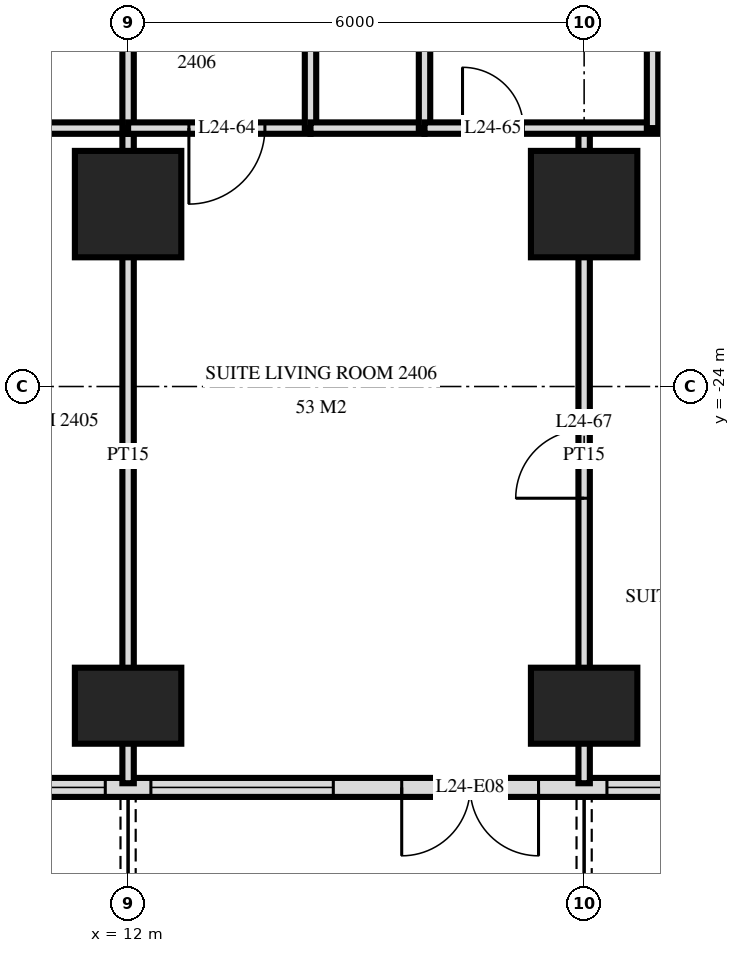
"""IFC4 building model, lengths in metres.
Left out: names, types, materials, properties, quantities, classifications, styles, units other than length and angle.
Written with IfcOpenShell. Run it as: python <this file> out.ifc"""

import sys

from ifc_helpers import new_model, si_unit, direction, frame, frame_2d, origin, origin_2d, place, context, subcontext, project, spatial, rectangle, extrude, element, fill, save


model = new_model("IFC4")
c1 = context("Model", 3, precision=1e-05, world=origin(), true_north=direction((0.0, 1.0)))
c2 = subcontext(c1, "Body", "Model", "MODEL_VIEW")
j1 = project(units=[si_unit("LENGTHUNIT", "METRE"), si_unit("PLANEANGLEUNIT", "RADIAN")], contexts=[c1])
p1 = place(None, origin())
s1 = spatial("IfcSite", under=j1, at=p1, CompositionType="ELEMENT")
p2 = place(p1, origin())
s2 = spatial("IfcBuilding", under=s1, at=p2, CompositionType="ELEMENT")
p3 = place(p2, frame((0.0, 0.0, 96.0)))
s3 = spatial("IfcBuildingStorey", under=s2, at=p3, CompositionType="ELEMENT", Elevation=96.0)
p4 = place(p3, frame((12.0, -28.2, 0.0), z_axis=(0.0, 0.0, 1.0), x_axis=(1.0, 0.0, 0.0)))
e1 = element("IfcColumn", 1, at=p4, inside=s3, PredefinedType="COLUMN", context=c2, shape_type="SweptSolid", body=[
    extrude(rectangle(XDim=1.4, YDim=1.0, at=origin_2d()), origin(), (0.0, 0.0, 1.0), 3.6),
])
p5 = place(p3, frame((12.0, -21.6, 0.0), z_axis=(0.0, 0.0, 1.0), x_axis=(1.0, 0.0, 0.0)))
e2 = element("IfcColumn", 2, at=p5, inside=s3, PredefinedType="COLUMN", context=c2, shape_type="SweptSolid", body=[
    extrude(rectangle(XDim=1.4, YDim=1.4, at=origin_2d()), origin(), (0.0, 0.0, 1.0), 3.6),
])
p6 = place(p3, frame((18.0, -28.2, 0.0), z_axis=(0.0, 0.0, 1.0), x_axis=(1.0, 0.0, 0.0)))
e3 = element("IfcColumn", 3, at=p6, inside=s3, PredefinedType="COLUMN", context=c2, shape_type="SweptSolid", body=[
    extrude(rectangle(XDim=1.4, YDim=1.0, at=origin_2d()), origin(), (0.0, 0.0, 1.0), 3.6),
])
p7 = place(p3, frame((18.0, -21.6, 0.0), z_axis=(0.0, 0.0, 1.0), x_axis=(1.0, 0.0, 0.0)))
e4 = element("IfcColumn", 4, at=p7, inside=s3, PredefinedType="COLUMN", context=c2, shape_type="SweptSolid", body=[
    extrude(rectangle(XDim=1.4, YDim=1.4, at=origin_2d()), origin(), (0.0, 0.0, 1.0), 3.6),
])
p8 = place(p3, frame((-28.775, -29.275, 0.0), z_axis=(0.0, 0.0, 1.0), x_axis=(1.0, 0.0, 0.0)))
e5 = element("IfcWall", 5, at=p8, inside=s3, PredefinedType="SOLIDWALL", context=c2, shape_type="SweptSolid", body=[
    extrude(rectangle(XDim=57.551, YDim=0.25, at=frame_2d((28.775, 0.0))), origin(), (0.0, 0.0, 1.0), 3.32),
])
p9 = place(p8, frame((0.575, 0.0, 0.0)))
e6 = element("IfcOpeningElement", 6, at=p9, cuts=e5, PredefinedType="OPENING", context=c2, shape_type="SweptSolid", body=[
    extrude(rectangle(XDim=1.8, YDim=2.4, at=frame_2d((0.9, 1.2))), frame((0.0, 0.135, 0.0), z_axis=(0.0, -1.0, 0.0), x_axis=(1.0, 0.0, 0.0)), (0.0, 0.0, 1.0), 0.27),
])
p10 = place(p8, frame((5.075, 0.0, 0.3)))
e7 = element("IfcOpeningElement", 7, at=p10, cuts=e5, PredefinedType="OPENING", context=c2, shape_type="SweptSolid", body=[
    extrude(rectangle(XDim=2.4, YDim=2.1, at=frame_2d((1.2, 1.05))), frame((0.0, 0.135, 0.0), z_axis=(0.0, -1.0, 0.0), x_axis=(1.0, 0.0, 0.0)), (0.0, 0.0, 1.0), 0.27),
])
p11 = place(p8, frame((8.375, 0.0, 0.0)))
e8 = element("IfcOpeningElement", 8, at=p11, cuts=e5, PredefinedType="OPENING", context=c2, shape_type="SweptSolid", body=[
    extrude(rectangle(XDim=1.8, YDim=2.4, at=frame_2d((0.9, 1.2))), frame((0.0, 0.135, 0.0), z_axis=(0.0, -1.0, 0.0), x_axis=(1.0, 0.0, 0.0)), (0.0, 0.0, 1.0), 0.27),
])
p12 = place(p8, frame((11.375, 0.0, 0.0)))
e9 = element("IfcOpeningElement", 9, at=p12, cuts=e5, PredefinedType="OPENING", context=c2, shape_type="SweptSolid", body=[
    extrude(rectangle(XDim=1.8, YDim=2.4, at=frame_2d((0.9, 1.2))), frame((0.0, 0.135, 0.0), z_axis=(0.0, -1.0, 0.0), x_axis=(1.0, 0.0, 0.0)), (0.0, 0.0, 1.0), 0.27),
])
p13 = place(p8, frame((14.075, 0.0, 0.3)))
e10 = element("IfcOpeningElement", 10, at=p13, cuts=e5, PredefinedType="OPENING", context=c2, shape_type="SweptSolid", body=[
    extrude(rectangle(XDim=2.4, YDim=2.1, at=frame_2d((1.2, 1.05))), frame((0.0, 0.135, 0.0), z_axis=(0.0, -1.0, 0.0), x_axis=(1.0, 0.0, 0.0)), (0.0, 0.0, 1.0), 0.27),
])
p14 = place(p8, frame((17.375, 0.0, 0.0)))
e11 = element("IfcOpeningElement", 11, at=p14, cuts=e5, PredefinedType="OPENING", context=c2, shape_type="SweptSolid", body=[
    extrude(rectangle(XDim=1.8, YDim=2.4, at=frame_2d((0.9, 1.2))), frame((0.0, 0.135, 0.0), z_axis=(0.0, -1.0, 0.0), x_axis=(1.0, 0.0, 0.0)), (0.0, 0.0, 1.0), 0.27),
])
p15 = place(p8, frame((20.075, 0.0, 0.3)))
e12 = element("IfcOpeningElement", 12, at=p15, cuts=e5, PredefinedType="OPENING", context=c2, shape_type="SweptSolid", body=[
    extrude(rectangle(XDim=2.4, YDim=2.1, at=frame_2d((1.2, 1.05))), frame((0.0, 0.135, 0.0), z_axis=(0.0, -1.0, 0.0), x_axis=(1.0, 0.0, 0.0)), (0.0, 0.0, 1.0), 0.27),
])
p16 = place(p8, frame((23.075, 0.0, 0.3)))
e13 = element("IfcOpeningElement", 13, at=p16, cuts=e5, PredefinedType="OPENING", context=c2, shape_type="SweptSolid", body=[
    extrude(rectangle(XDim=2.4, YDim=2.1, at=frame_2d((1.2, 1.05))), frame((0.0, 0.135, 0.0), z_axis=(0.0, -1.0, 0.0), x_axis=(1.0, 0.0, 0.0)), (0.0, 0.0, 1.0), 0.27),
])
p17 = place(p8, frame((26.375, 0.0, 0.0)))
e14 = element("IfcOpeningElement", 14, at=p17, cuts=e5, PredefinedType="OPENING", context=c2, shape_type="SweptSolid", body=[
    extrude(rectangle(XDim=1.8, YDim=2.4, at=frame_2d((0.9, 1.2))), frame((0.0, 0.135, 0.0), z_axis=(0.0, -1.0, 0.0), x_axis=(1.0, 0.0, 0.0)), (0.0, 0.0, 1.0), 0.27),
])
p18 = place(p8, frame((29.375, 0.0, 0.0)))
e15 = element("IfcOpeningElement", 15, at=p18, cuts=e5, PredefinedType="OPENING", context=c2, shape_type="SweptSolid", body=[
    extrude(rectangle(XDim=1.8, YDim=2.4, at=frame_2d((0.9, 1.2))), frame((0.0, 0.135, 0.0), z_axis=(0.0, -1.0, 0.0), x_axis=(1.0, 0.0, 0.0)), (0.0, 0.0, 1.0), 0.27),
])
p19 = place(p8, frame((32.075, 0.0, 0.3)))
e16 = element("IfcOpeningElement", 16, at=p19, cuts=e5, PredefinedType="OPENING", context=c2, shape_type="SweptSolid", body=[
    extrude(rectangle(XDim=2.4, YDim=2.1, at=frame_2d((1.2, 1.05))), frame((0.0, 0.135, 0.0), z_axis=(0.0, -1.0, 0.0), x_axis=(1.0, 0.0, 0.0)), (0.0, 0.0, 1.0), 0.27),
])
p20 = place(p8, frame((35.375, 0.0, 0.0)))
e17 = element("IfcOpeningElement", 17, at=p20, cuts=e5, PredefinedType="OPENING", context=c2, shape_type="SweptSolid", body=[
    extrude(rectangle(XDim=1.8, YDim=2.4, at=frame_2d((0.9, 1.2))), frame((0.0, 0.135, 0.0), z_axis=(0.0, -1.0, 0.0), x_axis=(1.0, 0.0, 0.0)), (0.0, 0.0, 1.0), 0.27),
])
p21 = place(p8, frame((38.075, 0.0, 0.3)))
e18 = element("IfcOpeningElement", 18, at=p21, cuts=e5, PredefinedType="OPENING", context=c2, shape_type="SweptSolid", body=[
    extrude(rectangle(XDim=2.4, YDim=2.1, at=frame_2d((1.2, 1.05))), frame((0.0, 0.135, 0.0), z_axis=(0.0, -1.0, 0.0), x_axis=(1.0, 0.0, 0.0)), (0.0, 0.0, 1.0), 0.27),
])
p22 = place(p8, frame((41.075, 0.0, 0.3)))
e19 = element("IfcOpeningElement", 19, at=p22, cuts=e5, PredefinedType="OPENING", context=c2, shape_type="SweptSolid", body=[
    extrude(rectangle(XDim=2.4, YDim=2.1, at=frame_2d((1.2, 1.05))), frame((0.0, 0.135, 0.0), z_axis=(0.0, -1.0, 0.0), x_axis=(1.0, 0.0, 0.0)), (0.0, 0.0, 1.0), 0.27),
])
p23 = place(p8, frame((44.375, 0.0, 0.0)))
e20 = element("IfcOpeningElement", 20, at=p23, cuts=e5, PredefinedType="OPENING", context=c2, shape_type="SweptSolid", body=[
    extrude(rectangle(XDim=1.8, YDim=2.4, at=frame_2d((0.9, 1.2))), frame((0.0, 0.135, 0.0), z_axis=(0.0, -1.0, 0.0), x_axis=(1.0, 0.0, 0.0)), (0.0, 0.0, 1.0), 0.27),
])
p24 = place(p8, frame((47.075, 0.0, 0.3)))
e21 = element("IfcOpeningElement", 21, at=p24, cuts=e5, PredefinedType="OPENING", context=c2, shape_type="SweptSolid", body=[
    extrude(rectangle(XDim=2.4, YDim=2.1, at=frame_2d((1.2, 1.05))), frame((0.0, 0.135, 0.0), z_axis=(0.0, -1.0, 0.0), x_axis=(1.0, 0.0, 0.0)), (0.0, 0.0, 1.0), 0.27),
])
p25 = place(p8, frame((50.375, 0.0, 0.0)))
e22 = element("IfcOpeningElement", 22, at=p25, cuts=e5, PredefinedType="OPENING", context=c2, shape_type="SweptSolid", body=[
    extrude(rectangle(XDim=1.8, YDim=2.4, at=frame_2d((0.9, 1.2))), frame((0.0, 0.135, 0.0), z_axis=(0.0, -1.0, 0.0), x_axis=(1.0, 0.0, 0.0)), (0.0, 0.0, 1.0), 0.27),
])
p26 = place(p8, frame((53.375, 0.0, 0.0)))
e23 = element("IfcOpeningElement", 23, at=p26, cuts=e5, PredefinedType="OPENING", context=c2, shape_type="SweptSolid", body=[
    extrude(rectangle(XDim=1.8, YDim=2.4, at=frame_2d((0.9, 1.2))), frame((0.0, 0.135, 0.0), z_axis=(0.0, -1.0, 0.0), x_axis=(1.0, 0.0, 0.0)), (0.0, 0.0, 1.0), 0.27),
])
p27 = place(p3, frame((18.9, -20.6, 0.0), z_axis=(0.0, 0.0, 1.0), x_axis=(0.0, 1.0, 0.0)))
e24 = element("IfcWall", 24, at=p27, inside=s3, PredefinedType="PARTITIONING", context=c2, shape_type="SweptSolid", body=[
    extrude(rectangle(XDim=3.6, YDim=0.15, at=frame_2d((1.8, 0.0))), origin(), (0.0, 0.0, 1.0), 3.32),
])
p28 = place(p3, frame((18.0, -29.22, 0.0), z_axis=(0.0, 0.0, 1.0), x_axis=(0.0, 1.0, 0.0)))
e25 = element("IfcWall", 25, at=p28, inside=s3, PredefinedType="PARTITIONING", context=c2, shape_type="SweptSolid", body=[
    extrude(rectangle(XDim=8.62, YDim=0.15, at=frame_2d((4.31, 0.0))), origin(), (0.0, 0.0, 1.0), 3.32),
])
p29 = place(p28, frame((3.75, 0.0, 0.0)))
e26 = element("IfcOpeningElement", 26, at=p29, cuts=e25, PredefinedType="OPENING", context=c2, shape_type="SweptSolid", body=[
    extrude(rectangle(XDim=0.9, YDim=2.1, at=frame_2d((0.45, 1.05))), frame((0.0, 0.085, 0.0), z_axis=(0.0, -1.0, 0.0), x_axis=(1.0, 0.0, 0.0)), (0.0, 0.0, 1.0), 0.17),
])
p30 = place(p3, frame((15.9, -20.6, 0.0), z_axis=(0.0, 0.0, 1.0), x_axis=(0.0, 1.0, 0.0)))
e27 = element("IfcWall", 27, at=p30, inside=s3, PredefinedType="PLUMBINGWALL", context=c2, shape_type="SweptSolid", body=[
    extrude(rectangle(XDim=3.6, YDim=0.15, at=frame_2d((1.8, 0.0))), origin(), (0.0, 0.0, 1.0), 3.32),
])
p31 = place(p3, frame((14.4, -20.6, 0.0), z_axis=(0.0, 0.0, 1.0), x_axis=(0.0, 1.0, 0.0)))
e28 = element("IfcWall", 28, at=p31, inside=s3, PredefinedType="PARTITIONING", context=c2, shape_type="SweptSolid", body=[
    extrude(rectangle(XDim=3.6, YDim=0.15, at=frame_2d((1.8, 0.0))), origin(), (0.0, 0.0, 1.0), 3.32),
])
p32 = place(p31, frame((1.3, 0.0, 0.0)))
e29 = element("IfcOpeningElement", 29, at=p32, cuts=e28, PredefinedType="OPENING", context=c2, shape_type="SweptSolid", body=[
    extrude(rectangle(XDim=1.0, YDim=2.1, at=frame_2d((0.5, 1.05))), frame((0.0, 0.085, 0.0), z_axis=(0.0, -1.0, 0.0), x_axis=(1.0, 0.0, 0.0)), (0.0, 0.0, 1.0), 0.17),
])
p33 = place(p3, frame((12.0, -20.6, 0.0), z_axis=(0.0, 0.0, 1.0), x_axis=(0.0, 1.0, 0.0)))
e30 = element("IfcWall", 30, at=p33, inside=s3, PredefinedType="PARTITIONING", context=c2, shape_type="SweptSolid", body=[
    extrude(rectangle(XDim=3.6, YDim=0.15, at=frame_2d((1.8, 0.0))), origin(), (0.0, 0.0, 1.0), 3.32),
])
p34 = place(p3, frame((12.0, -29.22, 0.0), z_axis=(0.0, 0.0, 1.0), x_axis=(0.0, 1.0, 0.0)))
e31 = element("IfcWall", 31, at=p34, inside=s3, PredefinedType="PARTITIONING", context=c2, shape_type="SweptSolid", body=[
    extrude(rectangle(XDim=8.62, YDim=0.15, at=frame_2d((4.31, 0.0))), origin(), (0.0, 0.0, 1.0), 3.32),
])
p35 = place(p3, frame((12.0, -20.6, 0.0), z_axis=(0.0, 0.0, 1.0), x_axis=(1.0, 0.0, 0.0)))
e32 = element("IfcWall", 32, at=p35, inside=s3, PredefinedType="PARTITIONING", context=c2, shape_type="SweptSolid", body=[
    extrude(rectangle(XDim=2.4, YDim=0.15, at=frame_2d((1.2, 0.0))), origin(), (0.0, 0.0, 1.0), 3.32),
])
p36 = place(p35, frame((0.8, 0.0, 0.0)))
e33 = element("IfcOpeningElement", 33, at=p36, cuts=e32, PredefinedType="OPENING", context=c2, shape_type="SweptSolid", body=[
    extrude(rectangle(XDim=1.0, YDim=2.1, at=frame_2d((0.5, 1.05))), frame((0.0, 0.085, 0.0), z_axis=(0.0, -1.0, 0.0), x_axis=(1.0, 0.0, 0.0)), (0.0, 0.0, 1.0), 0.17),
])
p37 = place(p3, frame((10.3, -20.6, 0.0), z_axis=(0.0, 0.0, 1.0), x_axis=(1.0, 0.0, 0.0)))
e34 = element("IfcWall", 34, at=p37, inside=s3, PredefinedType="PARTITIONING", context=c2, shape_type="SweptSolid", body=[
    extrude(rectangle(XDim=1.7, YDim=0.15, at=frame_2d((0.85, 0.0))), origin(), (0.0, 0.0, 1.0), 3.32),
])
p38 = place(p3, frame((15.9, -20.6, 0.0), z_axis=(0.0, 0.0, 1.0), x_axis=(1.0, 0.0, 0.0)))
e35 = element("IfcWall", 35, at=p38, inside=s3, PredefinedType="PARTITIONING", context=c2, shape_type="SweptSolid", body=[
    extrude(rectangle(XDim=5.1, YDim=0.15, at=frame_2d((2.55, 0.0))), origin(), (0.0, 0.0, 1.0), 3.32),
])
p39 = place(p38, frame((0.5, 0.0, 0.0)))
e36 = element("IfcOpeningElement", 36, at=p39, cuts=e35, PredefinedType="OPENING", context=c2, shape_type="SweptSolid", body=[
    extrude(rectangle(XDim=0.8, YDim=2.1, at=frame_2d((0.4, 1.05))), frame((0.0, 0.085, 0.0), z_axis=(0.0, -1.0, 0.0), x_axis=(1.0, 0.0, 0.0)), (0.0, 0.0, 1.0), 0.17),
])
p40 = place(p38, frame((3.58, 0.0, 0.0)))
e37 = element("IfcOpeningElement", 37, at=p40, cuts=e35, PredefinedType="OPENING", context=c2, shape_type="SweptSolid", body=[
    extrude(rectangle(XDim=0.9, YDim=2.1, at=frame_2d((0.45, 1.05))), frame((0.0, 0.085, 0.0), z_axis=(0.0, -1.0, 0.0), x_axis=(1.0, 0.0, 0.0)), (0.0, 0.0, 1.0), 0.17),
])
p41 = place(p3, frame((14.4, -20.6, 0.0), z_axis=(0.0, 0.0, 1.0), x_axis=(1.0, 0.0, 0.0)))
e38 = element("IfcWall", 38, at=p41, inside=s3, PredefinedType="PLUMBINGWALL", context=c2, shape_type="SweptSolid", body=[
    extrude(rectangle(XDim=1.5, YDim=0.15, at=frame_2d((0.75, 0.0))), origin(), (0.0, 0.0, 1.0), 3.32),
])
p42 = place(p21, origin())
e39 = element("IfcWindow", 39, at=p42, inside=s3, PartitioningType="SINGLE_PANEL", PredefinedType="WINDOW", context=c2, shape_type="SweptSolid", body=[
    extrude(rectangle(XDim=2.4, YDim=2.1, at=frame_2d((1.2, 1.05))), frame((0.0, 0.03, 0.0), z_axis=(0.0, -1.0, 0.0), x_axis=(1.0, 0.0, 0.0)), (0.0, 0.0, 1.0), 0.06),
])
fill(e18, e39)
p43 = place(p22, origin())
e40 = element("IfcWindow", 40, at=p43, inside=s3, PartitioningType="SINGLE_PANEL", PredefinedType="WINDOW", context=c2, shape_type="SweptSolid", body=[
    extrude(rectangle(XDim=2.4, YDim=2.1, at=frame_2d((1.2, 1.05))), frame((0.0, 0.03, 0.0), z_axis=(0.0, -1.0, 0.0), x_axis=(1.0, 0.0, 0.0)), (0.0, 0.0, 1.0), 0.06),
])
fill(e19, e40)
p44 = place(p23, frame((0.9, 0.0, 0.0), z_axis=(0.0, 0.0, 1.0), x_axis=(-1.0, 0.0, 0.0)))
e41 = element("IfcDoor", 41, at=p44, inside=s3, OperationType="DOUBLE_DOOR_SINGLE_SWING", PredefinedType="DOOR", context=c2, shape_type="SweptSolid", body=[
    extrude(rectangle(XDim=1.8, YDim=2.4, at=frame_2d((0.0, 1.2))), frame((0.0, -0.025, 0.0), z_axis=(0.0, 1.0, 0.0), x_axis=(-1.0, 0.0, 0.0)), (0.0, 0.0, 1.0), 0.05),
])
fill(e20, e41)
p45 = place(p24, origin())
e42 = element("IfcWindow", 42, at=p45, inside=s3, PartitioningType="SINGLE_PANEL", PredefinedType="WINDOW", context=c2, shape_type="SweptSolid", body=[
    extrude(rectangle(XDim=2.4, YDim=2.1, at=frame_2d((1.2, 1.05))), frame((0.0, 0.03, 0.0), z_axis=(0.0, -1.0, 0.0), x_axis=(1.0, 0.0, 0.0)), (0.0, 0.0, 1.0), 0.06),
])
fill(e21, e42)
p46 = place(p36, frame((0.5, 0.0, 0.0), z_axis=(0.0, 0.0, 1.0), x_axis=(-1.0, 0.0, 0.0)))
e43 = element("IfcDoor", 43, at=p46, inside=s3, OperationType="SINGLE_SWING_LEFT", PredefinedType="DOOR", context=c2, shape_type="SweptSolid", body=[
    extrude(rectangle(XDim=1.0, YDim=2.1, at=frame_2d((0.0, 1.05))), frame((0.0, -0.025, 0.0), z_axis=(0.0, 1.0, 0.0), x_axis=(-1.0, 0.0, 0.0)), (0.0, 0.0, 1.0), 0.05),
])
fill(e33, e43)
p47 = place(p39, origin())
e44 = element("IfcDoor", 44, at=p47, inside=s3, OperationType="SINGLE_SWING_RIGHT", PredefinedType="DOOR", context=c2, shape_type="SweptSolid", body=[
    extrude(rectangle(XDim=0.8, YDim=2.1, at=frame_2d((0.4, 1.05))), frame((0.0, 0.025, 0.0), z_axis=(0.0, -1.0, 0.0), x_axis=(1.0, 0.0, 0.0)), (0.0, 0.0, 1.0), 0.05),
])
fill(e36, e44)
p48 = place(p29, origin())
e45 = element("IfcDoor", 45, at=p48, inside=s3, OperationType="SINGLE_SWING_RIGHT", PredefinedType="DOOR", context=c2, shape_type="SweptSolid", body=[
    extrude(rectangle(XDim=0.9, YDim=2.1, at=frame_2d((0.45, 1.05))), frame((0.0, 0.025, 0.0), z_axis=(0.0, -1.0, 0.0), x_axis=(1.0, 0.0, 0.0)), (0.0, 0.0, 1.0), 0.05),
])
fill(e26, e45)
save(model, sys.argv[1])
